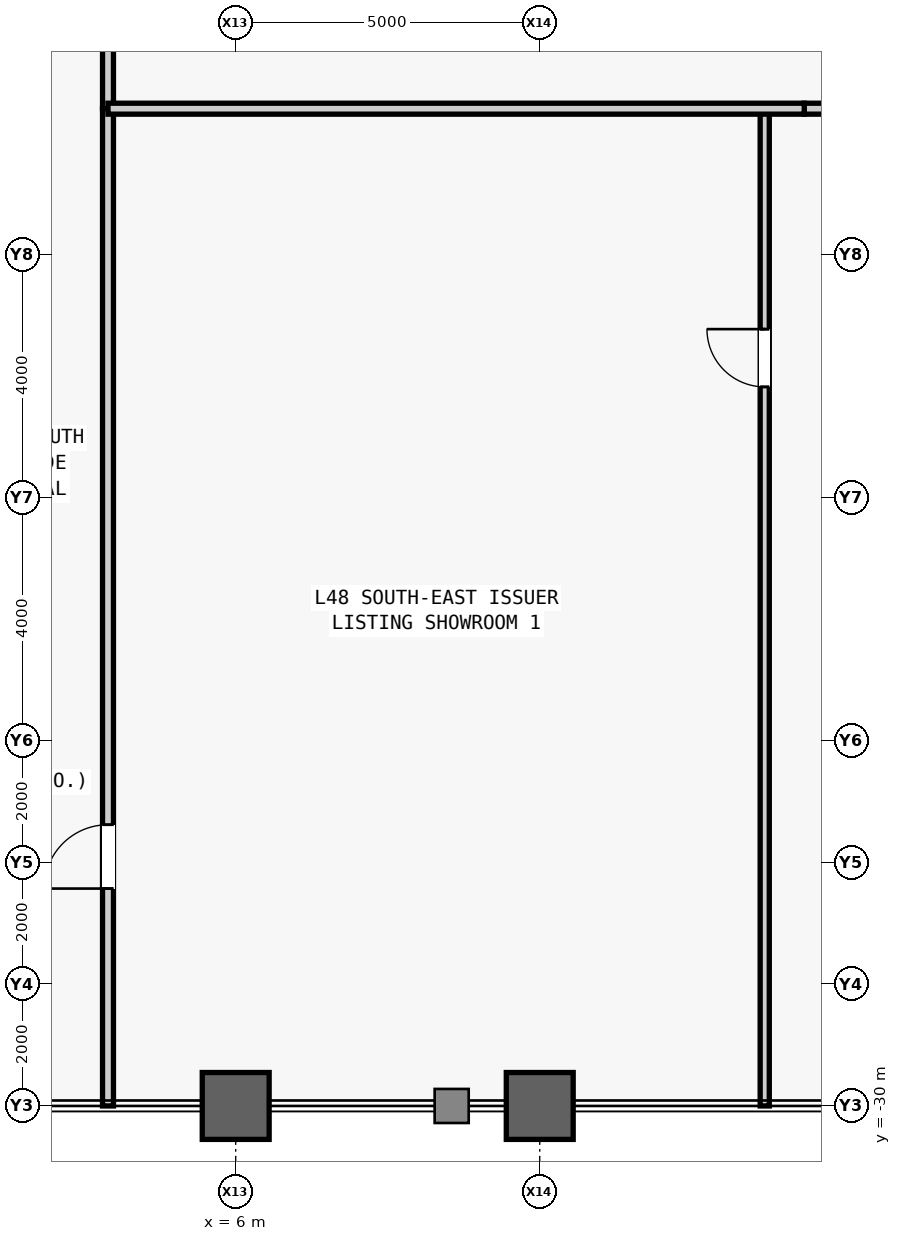
"""IFC4 building model, lengths in metres.
Left out: names, types, materials, properties, quantities, classifications, styles, units other than length and angle.
Written with IfcOpenShell. Run it as: python <this file> out.ifc"""

import sys

from ifc_helpers import new_model, si_unit, direction, frame, frame_2d, origin, origin_2d, place, context, subcontext, project, spatial, rectangle, hollow_rectangle, extrude, source, transform, mapped, element, fill, save


model = new_model("IFC4")
c1 = context("Model", 3, precision=1e-05, world=origin(), true_north=direction((0.0, 1.0)))
c2 = subcontext(c1, "Body", "Model", "MODEL_VIEW")
j1 = project(units=[si_unit("LENGTHUNIT", "METRE"), si_unit("PLANEANGLEUNIT", "RADIAN")], contexts=[c1])
p1 = place(None, origin())
s1 = spatial("IfcSite", under=j1, at=p1, CompositionType="ELEMENT")
p2 = place(p1, origin())
s2 = spatial("IfcBuilding", under=s1, at=p2, CompositionType="ELEMENT")
p3 = place(p2, frame((0.0, 0.0, 207.1)))
s3 = spatial("IfcBuildingStorey", under=s2, at=p3, CompositionType="ELEMENT", Elevation=207.1)
m1 = source(origin(), c2, "Body", "SweptSolid", [
    extrude(hollow_rectangle(XDim=1.1, YDim=1.1, WallThickness=0.06, at=origin_2d()), origin(), (0.0, 0.0, 1.0), 4.0),
])
for number, where, z_axis, x_axis in (
    (1, (6.0, -30.0, 0.0), (0.0, 0.0, 1.0), (1.0, 0.0, 0.0)),
    (2, (11.0, -30.0, 0.0), (0.0, 0.0, 1.0), (1.0, 0.0, 0.0)),
):
    element("IfcColumn", number, at=place(p3, frame(where, z_axis=z_axis, x_axis=x_axis)), inside=s3, PredefinedType="COLUMN", context=c2, shape_type="MappedRepresentation", body=[
        mapped(m1, transform((0.0, 0.0, 0.0), scale=1.0)),
    ])
m2 = source(origin(), c2, "Body", "SweptSolid", [
    extrude(rectangle(XDim=2.45, YDim=0.18, at=frame_2d((1.225, 0.0))), origin(), (0.0, 0.0, 1.0), 3.78),
])
p4 = place(p3, frame((15.35, -13.6, 0.0), z_axis=(0.0, 0.0, 1.0), x_axis=(1.0, 0.0, 0.0)))
e3 = element("IfcWall", 3, at=p4, inside=s3, PredefinedType="PARTITIONING", context=c2, shape_type="MappedRepresentation", body=[
    mapped(m2, transform((0.0, 0.0, 0.0), scale=1.0)),
])
m3 = source(origin(), c2, "Body", "SweptSolid", [
    extrude(rectangle(XDim=2.6, YDim=0.18, at=frame_2d((1.3, 0.0))), origin(), (0.0, 0.0, 1.0), 3.78),
])
p5 = place(p3, frame((3.9, -13.6, 0.0), z_axis=(0.0, 0.0, 1.0), x_axis=(0.0, 1.0, 0.0)))
e4 = element("IfcWall", 4, at=p5, inside=s3, PredefinedType="PARTITIONING", context=c2, shape_type="MappedRepresentation", body=[
    mapped(m3, transform((0.0, 0.0, 0.0), scale=1.0)),
])
m4 = source(origin(), c2, "Body", "SweptSolid", [
    extrude(rectangle(XDim=16.4, YDim=0.15, at=frame_2d((8.2, 0.0))), origin(), (0.0, 0.0, 1.0), 3.78),
])
p6 = place(p3, frame((14.7, -30.0, 0.0), z_axis=(0.0, 0.0, 1.0), x_axis=(0.0, 1.0, 0.0)))
e5 = element("IfcWall", 5, at=p6, inside=s3, PredefinedType="PARTITIONING", context=c2, shape_type="MappedRepresentation", body=[
    mapped(m4, transform((0.0, 0.0, 0.0), scale=1.0)),
])
m5 = source(origin(), c2, "Body", "SweptSolid", [
    extrude(rectangle(XDim=0.95, YDim=2.15, at=frame_2d((0.475, 1.075))), frame((0.0, 0.085, 0.0), z_axis=(0.0, -1.0, 0.0), x_axis=(1.0, 0.0, 0.0)), (0.0, 0.0, 1.0), 0.17),
])
p7 = place(p6, frame((11.825, 0.0, 0.0)))
e6 = element("IfcOpeningElement", 6, at=p7, cuts=e5, PredefinedType="OPENING", context=c2, shape_type="MappedRepresentation", body=[
    mapped(m5, transform((0.0, 0.0, 0.0), scale=1.0)),
])
m6 = source(origin(), c2, "Body", "SweptSolid", [
    extrude(rectangle(XDim=16.4, YDim=0.18, at=frame_2d((8.2, 0.0))), origin(), (0.0, 0.0, 1.0), 3.78),
])
p8 = place(p3, frame((3.9, -30.0, 0.0), z_axis=(0.0, 0.0, 1.0), x_axis=(0.0, 1.0, 0.0)))
e7 = element("IfcWall", 7, at=p8, inside=s3, PredefinedType="PARTITIONING", context=c2, shape_type="MappedRepresentation", body=[
    mapped(m6, transform((0.0, 0.0, 0.0), scale=1.0)),
])
m7 = source(origin(), c2, "Body", "SweptSolid", [
    extrude(rectangle(XDim=1.05, YDim=2.2, at=frame_2d((0.525, 1.1))), frame((0.0, 0.1, 0.0), z_axis=(0.0, -1.0, 0.0), x_axis=(1.0, 0.0, 0.0)), (0.0, 0.0, 1.0), 0.2),
])
p9 = place(p8, frame((3.575, 0.0, 0.0)))
e8 = element("IfcOpeningElement", 8, at=p9, cuts=e7, PredefinedType="OPENING", context=c2, shape_type="MappedRepresentation", body=[
    mapped(m7, transform((0.0, 0.0, 0.0), scale=1.0)),
])
m8 = source(origin(), c2, "Body", "SweptSolid", [
    extrude(rectangle(XDim=11.45, YDim=0.18, at=frame_2d((5.725, 0.0))), origin(), (0.0, 0.0, 1.0), 3.78),
])
p10 = place(p3, frame((3.9, -13.6, 0.0), z_axis=(0.0, 0.0, 1.0), x_axis=(1.0, 0.0, 0.0)))
e9 = element("IfcWall", 9, at=p10, inside=s3, PredefinedType="PARTITIONING", context=c2, shape_type="MappedRepresentation", body=[
    mapped(m8, transform((0.0, 0.0, 0.0), scale=1.0)),
])
m9 = source(origin(), c2, "Body", "SweptSolid", [
    extrude(rectangle(XDim=0.95, YDim=2.15, at=frame_2d((0.475, 1.075))), frame((0.0, 0.025, 0.0), z_axis=(0.0, -1.0, 0.0), x_axis=(1.0, 0.0, 0.0)), (0.0, 0.0, 1.0), 0.05),
])
p11 = place(p7, origin())
e10 = element("IfcDoor", 10, at=p11, inside=s3, OperationType="SINGLE_SWING_RIGHT", PredefinedType="DOOR", context=c2, shape_type="MappedRepresentation", body=[
    mapped(m9, transform((0.0, 0.0, 0.0), scale=1.0)),
])
fill(e6, e10)
m10 = source(origin(), c2, "Body", "SweptSolid", [
    extrude(rectangle(XDim=1.05, YDim=2.2, at=frame_2d((0.525, 1.1))), frame((0.0, 0.025, 0.0), z_axis=(0.0, -1.0, 0.0), x_axis=(1.0, 0.0, 0.0)), (0.0, 0.0, 1.0), 0.05),
])
p12 = place(p9, origin())
e11 = element("IfcDoor", 11, at=p12, inside=s3, OperationType="SINGLE_SWING_LEFT", PredefinedType="DOOR", context=c2, shape_type="MappedRepresentation", body=[
    mapped(m10, transform((0.0, 0.0, 0.0), scale=1.0)),
])
fill(e8, e11)
save(model, sys.argv[1])
